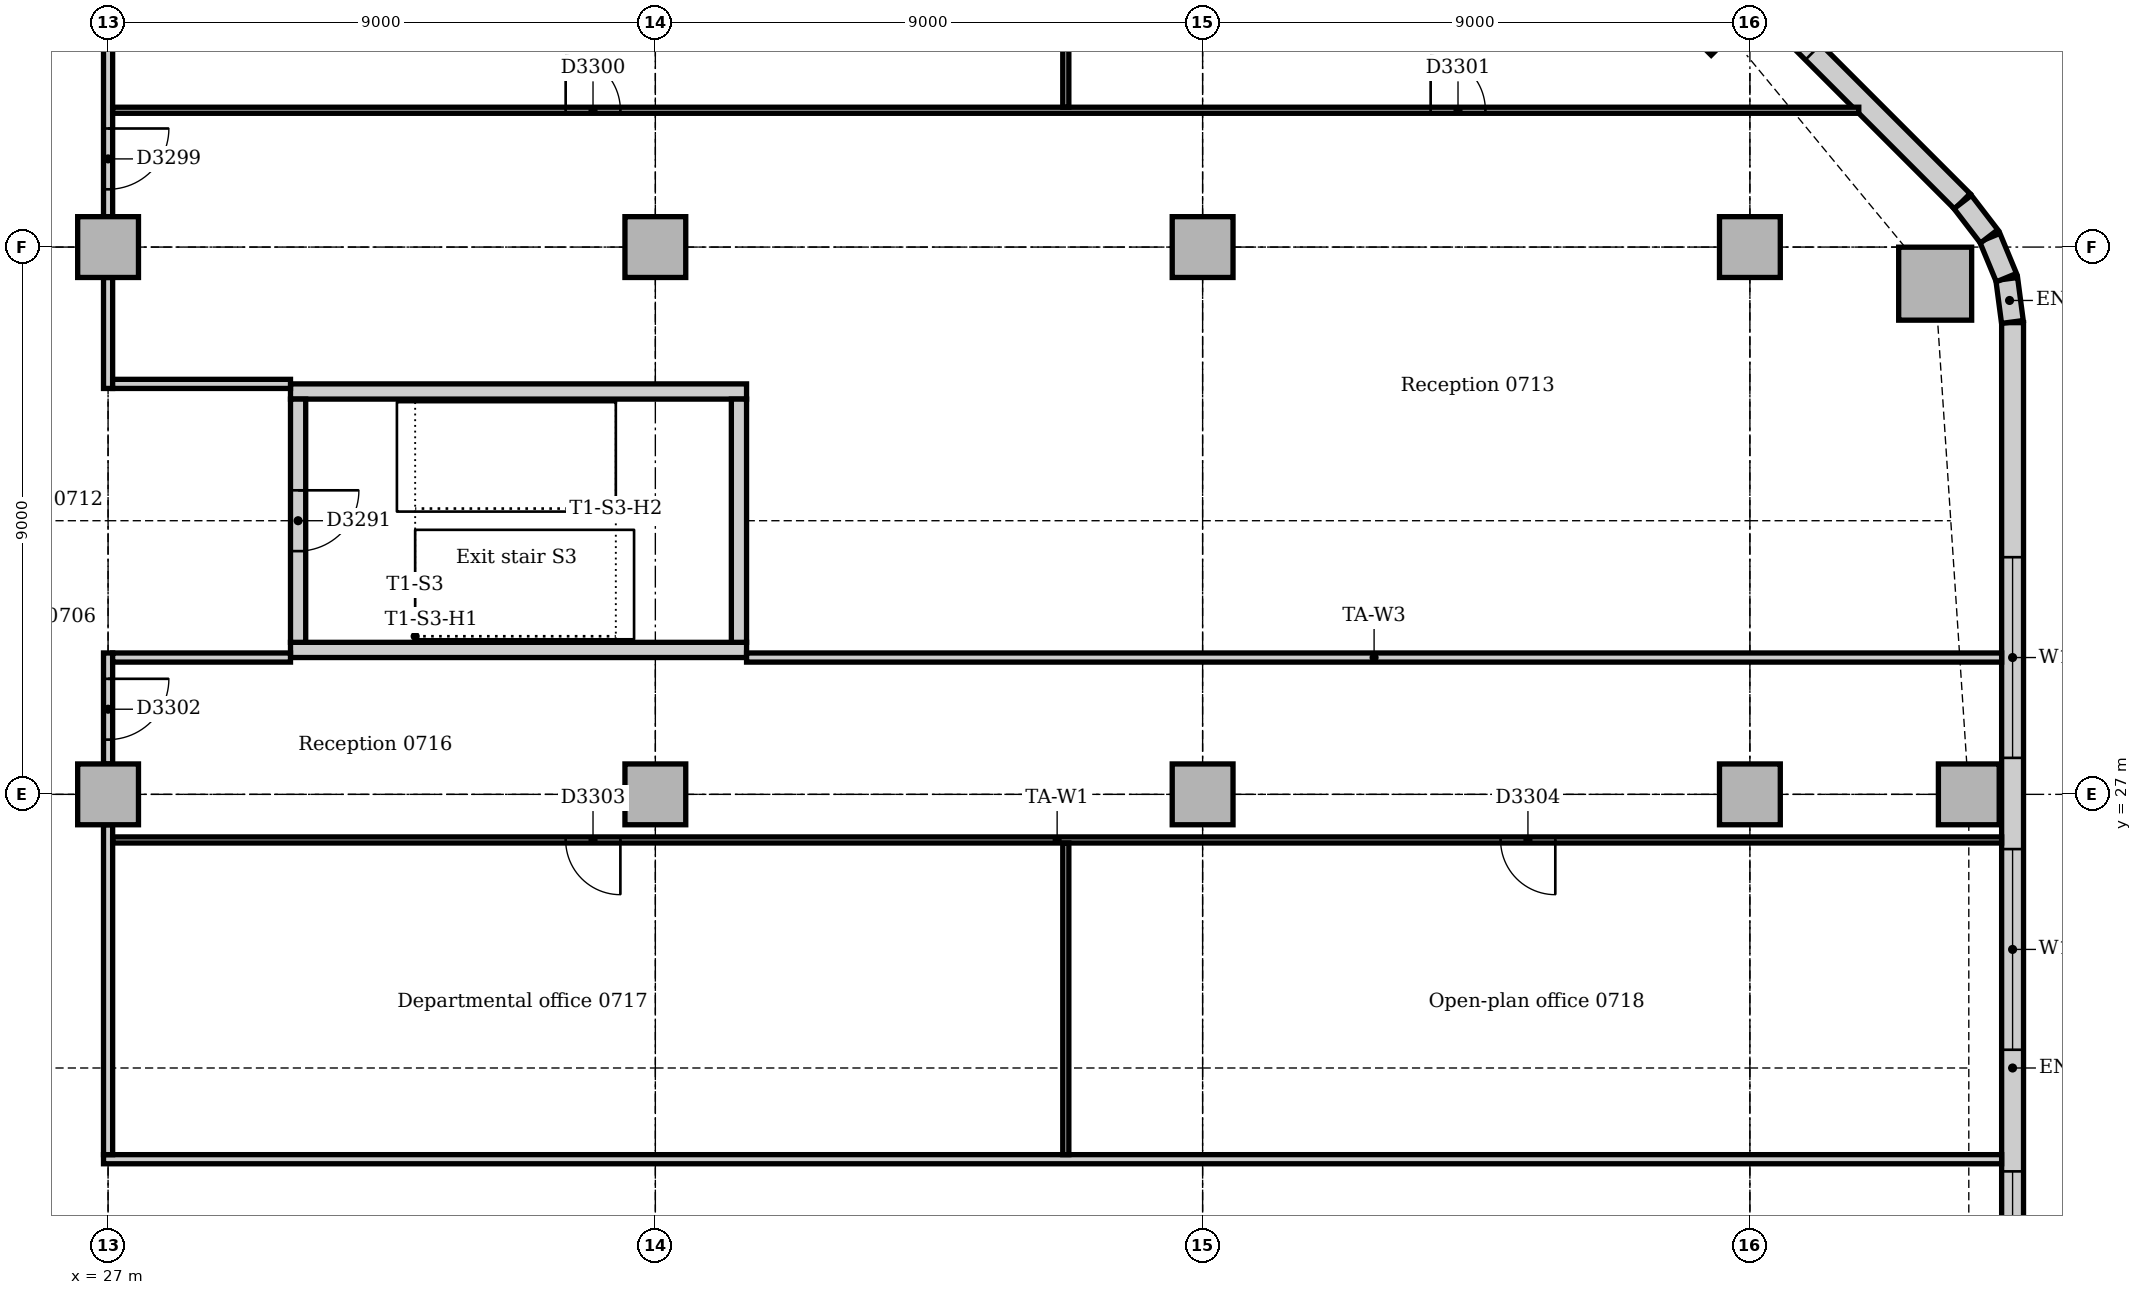
"""IFC4 building model, lengths in metres.
Left out: names, types, materials, properties, quantities, classifications, styles, units other than length and angle.
Written with IfcOpenShell. Run it as: python <this file> out.ifc"""

import sys

from ifc_helpers import new_model, si_unit, direction, frame, frame_2d, origin, origin_2d, place, context, subcontext, project, spatial, rectangle, extrude, element, fill, save


model = new_model("IFC4")
c1 = context("Model", 3, precision=1e-05, world=origin(), true_north=direction((0.0, 1.0)))
c2 = subcontext(c1, "Body", "Model", "MODEL_VIEW")
j1 = project(units=[si_unit("LENGTHUNIT", "METRE"), si_unit("PLANEANGLEUNIT", "RADIAN")], contexts=[c1])
p1 = place(None, origin())
s1 = spatial("IfcSite", under=j1, at=p1, CompositionType="ELEMENT")
p2 = place(p1, origin())
s2 = spatial("IfcBuilding", under=s1, at=p2, CompositionType="ELEMENT")
p3 = place(p2, frame((0.0, 0.0, 34.0)))
s3 = spatial("IfcBuildingStorey", under=s2, at=p3, CompositionType="ELEMENT", Elevation=34.0)
for number, where, z_axis, x_axis in (
    (1, (30.0, 29.375, 0.0), (0.0, 0.0, 1.0), (1.0, 0.0, 0.0)),
    (2, (37.5, 33.625, 0.0), (0.0, 0.0, 1.0), (-1.0, 0.0, 0.0)),
):
    element("IfcWall", number, at=place(p3, frame(where, z_axis=z_axis, x_axis=x_axis)), inside=s3, PredefinedType="SOLIDWALL", context=c2, shape_type="SweptSolid", body=[
        extrude(rectangle(XDim=7.5, YDim=0.25, at=frame_2d((3.75, 0.0))), origin(), (0.0, 0.0, 1.0), 4.0),
    ])
p4 = place(p3, frame((37.375, 29.5, 0.0), z_axis=(0.0, 0.0, 1.0), x_axis=(0.0, 1.0, 0.0)))
e3 = element("IfcWall", 3, at=p4, inside=s3, PredefinedType="SOLIDWALL", context=c2, shape_type="SweptSolid", body=[
    extrude(rectangle(XDim=4.0, YDim=0.25, at=frame_2d((2.0, 0.0))), origin(), (0.0, 0.0, 1.0), 4.0),
])
p5 = place(p3, frame((30.125, 33.5, 0.0), z_axis=(0.0, 0.0, 1.0), x_axis=(0.0, -1.0, 0.0)))
e4 = element("IfcWall", 4, at=p5, inside=s3, PredefinedType="SOLIDWALL", context=c2, shape_type="SweptSolid", body=[
    extrude(rectangle(XDim=4.0, YDim=0.25, at=frame_2d((2.0, 0.0))), origin(), (0.0, 0.0, 1.0), 4.0),
])
p6 = place(p5, frame((1.5, 0.0, 0.0)))
e5 = element("IfcOpeningElement", 5, at=p6, cuts=e4, PredefinedType="OPENING", context=c2, shape_type="SweptSolid", body=[
    extrude(rectangle(XDim=1.0, YDim=2.1, at=frame_2d((0.5, 1.05))), frame((0.0, 0.135, 0.0), z_axis=(0.0, -1.0, 0.0), x_axis=(1.0, 0.0, 0.0)), (0.0, 0.0, 1.0), 0.27),
])
p7 = place(p3, frame((57.047, 35.398, 0.0), z_axis=(0.0, 0.0, 1.0), x_axis=(1.0, 0.0, 0.0)))
e6 = element("IfcColumn", 6, at=p7, inside=s3, PredefinedType="COLUMN", context=c2, shape_type="SweptSolid", body=[
    extrude(rectangle(XDim=1.2, YDim=1.2, at=origin_2d()), origin(), (0.0, 0.0, 1.0), 3.85),
])
for number, where, z_axis, x_axis in (
    (7, (57.6, 27.0, 0.0), (0.0, 0.0, 1.0), (1.0, 0.0, 0.0)),
    (8, (53.364, 39.864, 0.0), (0.0, 0.0, 1.0), (0.707, 0.707, 0.0)),
    (9, (27.0, 27.0, 0.0), (0.0, 0.0, 1.0), (1.0, 0.0, 0.0)),
    (10, (27.0, 36.0, 0.0), (0.0, 0.0, 1.0), (1.0, 0.0, 0.0)),
    (11, (36.0, 27.0, 0.0), (0.0, 0.0, 1.0), (1.0, 0.0, 0.0)),
    (12, (36.0, 36.0, 0.0), (0.0, 0.0, 1.0), (1.0, 0.0, 0.0)),
    (13, (45.0, 27.0, 0.0), (0.0, 0.0, 1.0), (1.0, 0.0, 0.0)),
    (14, (45.0, 36.0, 0.0), (0.0, 0.0, 1.0), (1.0, 0.0, 0.0)),
    (15, (54.0, 27.0, 0.0), (0.0, 0.0, 1.0), (1.0, 0.0, 0.0)),
    (16, (54.0, 36.0, 0.0), (0.0, 0.0, 1.0), (1.0, 0.0, 0.0)),
):
    element("IfcColumn", number, at=place(p3, frame(where, z_axis=z_axis, x_axis=x_axis)), inside=s3, PredefinedType="COLUMN", context=c2, shape_type="SweptSolid", body=[
        extrude(rectangle(XDim=1.0, YDim=1.0, at=origin_2d()), origin(), (0.0, 0.0, 1.0), 3.85),
    ])
p8 = place(p3, frame((58.32, 10.243, 0.0), z_axis=(0.0, 0.0, 1.0), x_axis=(0.0, 1.0, 0.0)))
e17 = element("IfcWall", 17, at=p8, inside=s3, PredefinedType="STANDARD", context=c2, shape_type="SweptSolid", body=[
    extrude(rectangle(XDim=24.515, YDim=0.36, at=frame_2d((12.257, 0.0))), origin(), (0.0, 0.0, 1.0), 3.85),
])
p9 = place(p8, frame((3.857, 0.0, 0.9)))
e18 = element("IfcOpeningElement", 18, at=p9, cuts=e17, PredefinedType="OPENING", context=c2, shape_type="SweptSolid", body=[
    extrude(rectangle(XDim=3.3, YDim=1.6, at=frame_2d((1.65, 0.8))), frame((0.0, 0.19, 0.0), z_axis=(0.0, -1.0, 0.0), x_axis=(1.0, 0.0, 0.0)), (0.0, 0.0, 1.0), 0.38),
])
p10 = place(p8, frame((8.757, 0.0, 0.9)))
e19 = element("IfcOpeningElement", 19, at=p10, cuts=e17, PredefinedType="OPENING", context=c2, shape_type="SweptSolid", body=[
    extrude(rectangle(XDim=1.8, YDim=1.6, at=frame_2d((0.9, 0.8))), frame((0.0, 0.19, 0.0), z_axis=(0.0, -1.0, 0.0), x_axis=(1.0, 0.0, 0.0)), (0.0, 0.0, 1.0), 0.38),
])
p11 = place(p8, frame((12.557, 0.0, 0.9)))
e20 = element("IfcOpeningElement", 20, at=p11, cuts=e17, PredefinedType="OPENING", context=c2, shape_type="SweptSolid", body=[
    extrude(rectangle(XDim=3.3, YDim=1.6, at=frame_2d((1.65, 0.8))), frame((0.0, 0.19, 0.0), z_axis=(0.0, -1.0, 0.0), x_axis=(1.0, 0.0, 0.0)), (0.0, 0.0, 1.0), 0.38),
])
p12 = place(p8, frame((17.357, 0.0, 0.9)))
e21 = element("IfcOpeningElement", 21, at=p12, cuts=e17, PredefinedType="OPENING", context=c2, shape_type="SweptSolid", body=[
    extrude(rectangle(XDim=3.3, YDim=1.6, at=frame_2d((1.65, 0.8))), frame((0.0, 0.19, 0.0), z_axis=(0.0, -1.0, 0.0), x_axis=(1.0, 0.0, 0.0)), (0.0, 0.0, 1.0), 0.38),
])
p13 = place(p3, frame((57.494, 36.751, 0.0), z_axis=(0.0, 0.0, 1.0), x_axis=(-0.707106781187, 0.707106781187, 0.0)))
e22 = element("IfcWall", 22, at=p13, inside=s3, PredefinedType="STANDARD", context=c2, shape_type="SweptSolid", body=[
    extrude(rectangle(XDim=10.243, YDim=0.36, at=frame_2d((5.121, 0.0))), origin(), (0.0, 0.0, 1.0), 3.85),
])
p14 = place(p13, frame((3.471, 0.0, 0.9)))
e23 = element("IfcOpeningElement", 23, at=p14, cuts=e22, PredefinedType="OPENING", context=c2, shape_type="SweptSolid", body=[
    extrude(rectangle(XDim=3.3, YDim=1.6, at=frame_2d((1.65, 0.8))), frame((0.0, 0.19, 0.0), z_axis=(0.0, -1.0, 0.0), x_axis=(1.0, 0.0, 0.0)), (0.0, 0.0, 1.0), 0.38),
])
for number, where, z_axis, x_axis in (
    (24, (58.317, 34.769, 0.0), (0.0, 0.0, 1.0), (-0.131, 0.991, 0.0)),
    (25, (58.218, 35.497, 0.0), (0.0, 0.0, 1.0), (-0.383, 0.924, 0.0)),
):
    element("IfcWall", number, at=place(p3, frame(where, z_axis=z_axis, x_axis=x_axis)), inside=s3, PredefinedType="STANDARD", context=c2, shape_type="SweptSolid", body=[
        extrude(rectangle(XDim=0.713, YDim=0.36, at=frame_2d((0.356, 0.0))), origin(), (0.0, 0.0, 1.0), 3.85),
    ])
p15 = place(p3, frame((57.934, 36.175, 0.0), z_axis=(0.0, 0.0, 1.0), x_axis=(-0.608802368033, 0.793321924995, 0.0)))
e26 = element("IfcWall", 26, at=p15, inside=s3, PredefinedType="STANDARD", context=c2, shape_type="SweptSolid", body=[
    extrude(rectangle(XDim=0.713, YDim=0.36, at=frame_2d((0.357, 0.0))), origin(), (0.0, 0.0, 1.0), 3.85),
])
p16 = place(p3, frame((26.925, 21.0, 0.0), z_axis=(0.0, 0.0, 1.0), x_axis=(1.0, 0.0, 0.0)))
e27 = element("IfcWall", 27, at=p16, inside=s3, PredefinedType="PARTITIONING", context=c2, shape_type="SweptSolid", body=[
    extrude(rectangle(XDim=31.215, YDim=0.15, at=frame_2d((15.607, 0.0))), origin(), (0.0, 0.0, 1.0), 3.85),
])
p17 = place(p3, frame((27.0, 33.675, 0.0), z_axis=(0.0, 0.0, 1.0), x_axis=(0.0, 1.0, 0.0)))
e28 = element("IfcWall", 28, at=p17, inside=s3, PredefinedType="PARTITIONING", context=c2, shape_type="SweptSolid", body=[
    extrude(rectangle(XDim=1.825, YDim=0.15, at=frame_2d((0.912, 0.0))), origin(), (0.0, 0.0, 1.0), 3.158),
])
p18 = place(p3, frame((27.0, 36.5, 0.0), z_axis=(0.0, 0.0, 1.0), x_axis=(0.0, 1.0, 0.0)))
e29 = element("IfcWall", 29, at=p18, inside=s3, PredefinedType="PARTITIONING", context=c2, shape_type="SweptSolid", body=[
    extrude(rectangle(XDim=7.1, YDim=0.15, at=frame_2d((3.55, 0.0))), origin(), (0.0, 0.0, 1.0), 3.158),
])
p19 = place(p18, frame((0.45, 0.0, 0.0)))
e30 = element("IfcOpeningElement", 30, at=p19, cuts=e29, PredefinedType="OPENING", context=c2, shape_type="SweptSolid", body=[
    extrude(rectangle(XDim=1.0, YDim=2.1, at=frame_2d((0.5, 1.05))), frame((0.0, 0.085, 0.0), z_axis=(0.0, -1.0, 0.0), x_axis=(1.0, 0.0, 0.0)), (0.0, 0.0, 1.0), 0.17),
])
p20 = place(p3, frame((27.0, 21.075, 0.0), z_axis=(0.0, 0.0, 1.0), x_axis=(0.0, 1.0, 0.0)))
e31 = element("IfcWall", 31, at=p20, inside=s3, PredefinedType="PARTITIONING", context=c2, shape_type="SweptSolid", body=[
    extrude(rectangle(XDim=5.425, YDim=0.15, at=frame_2d((2.712, 0.0))), origin(), (0.0, 0.0, 1.0), 3.158),
])
p21 = place(p3, frame((27.0, 27.5, 0.0), z_axis=(0.0, 0.0, 1.0), x_axis=(0.0, 1.0, 0.0)))
e32 = element("IfcWall", 32, at=p21, inside=s3, PredefinedType="PARTITIONING", context=c2, shape_type="SweptSolid", body=[
    extrude(rectangle(XDim=1.825, YDim=0.15, at=frame_2d((0.912, 0.0))), origin(), (0.0, 0.0, 1.0), 3.158),
])
p22 = place(p21, frame((0.4, 0.0, 0.0)))
e33 = element("IfcOpeningElement", 33, at=p22, cuts=e32, PredefinedType="OPENING", context=c2, shape_type="SweptSolid", body=[
    extrude(rectangle(XDim=1.0, YDim=2.1, at=frame_2d((0.5, 1.05))), frame((0.0, 0.085, 0.0), z_axis=(0.0, -1.0, 0.0), x_axis=(1.0, 0.0, 0.0)), (0.0, 0.0, 1.0), 0.17),
])
for number, where, z_axis, x_axis in (
    (34, (27.075, 29.25, 0.0), (0.0, 0.0, 1.0), (1.0, 0.0, 0.0)),
    (35, (27.075, 33.75, 0.0), (0.0, 0.0, 1.0), (1.0, 0.0, 0.0)),
):
    element("IfcWall", number, at=place(p3, frame(where, z_axis=z_axis, x_axis=x_axis)), inside=s3, PredefinedType="PARTITIONING", context=c2, shape_type="SweptSolid", body=[
        extrude(rectangle(XDim=2.925, YDim=0.15, at=frame_2d((1.462, 0.0))), origin(), (0.0, 0.0, 1.0), 3.85),
    ])
p23 = place(p3, frame((37.5, 29.25, 0.0), z_axis=(0.0, 0.0, 1.0), x_axis=(1.0, 0.0, 0.0)))
e36 = element("IfcWall", 36, at=p23, inside=s3, PredefinedType="PARTITIONING", context=c2, shape_type="SweptSolid", body=[
    extrude(rectangle(XDim=20.64, YDim=0.15, at=frame_2d((10.32, 0.0))), origin(), (0.0, 0.0, 1.0), 3.85),
])
p24 = place(p3, frame((27.075, 26.25, 0.0), z_axis=(0.0, 0.0, 1.0), x_axis=(1.0, 0.0, 0.0)))
e37 = element("IfcWall", 37, at=p24, inside=s3, PredefinedType="PARTITIONING", context=c2, shape_type="SweptSolid", body=[
    extrude(rectangle(XDim=31.065, YDim=0.1, at=frame_2d((15.533, 0.0))), origin(), (0.0, 0.0, 1.0), 3.85),
])
p25 = place(p24, frame((7.45, 0.0, 0.0)))
e38 = element("IfcOpeningElement", 38, at=p25, cuts=e37, PredefinedType="OPENING", context=c2, shape_type="SweptSolid", body=[
    extrude(rectangle(XDim=0.9, YDim=2.1, at=frame_2d((0.45, 1.05))), frame((0.0, 0.06, 0.0), z_axis=(0.0, -1.0, 0.0), x_axis=(1.0, 0.0, 0.0)), (0.0, 0.0, 1.0), 0.12),
])
p26 = place(p24, frame((22.825, 0.0, 0.0)))
e39 = element("IfcOpeningElement", 39, at=p26, cuts=e37, PredefinedType="OPENING", context=c2, shape_type="SweptSolid", body=[
    extrude(rectangle(XDim=0.9, YDim=2.1, at=frame_2d((0.45, 1.05))), frame((0.0, 0.06, 0.0), z_axis=(0.0, -1.0, 0.0), x_axis=(1.0, 0.0, 0.0)), (0.0, 0.0, 1.0), 0.12),
])
p27 = place(p3, frame((27.075, 38.25, 0.0), z_axis=(0.0, 0.0, 1.0), x_axis=(1.0, 0.0, 0.0)))
e40 = element("IfcWall", 40, at=p27, inside=s3, PredefinedType="PARTITIONING", context=c2, shape_type="SweptSolid", body=[
    extrude(rectangle(XDim=28.716, YDim=0.1, at=frame_2d((14.358, 0.0))), origin(), (0.0, 0.0, 1.0), 3.85),
])
p28 = place(p27, frame((7.45, 0.0, 0.0)))
e41 = element("IfcOpeningElement", 41, at=p28, cuts=e40, PredefinedType="OPENING", context=c2, shape_type="SweptSolid", body=[
    extrude(rectangle(XDim=0.9, YDim=2.1, at=frame_2d((0.45, 1.05))), frame((0.0, 0.06, 0.0), z_axis=(0.0, -1.0, 0.0), x_axis=(1.0, 0.0, 0.0)), (0.0, 0.0, 1.0), 0.12),
])
p29 = place(p27, frame((21.675, 0.0, 0.0)))
e42 = element("IfcOpeningElement", 42, at=p29, cuts=e40, PredefinedType="OPENING", context=c2, shape_type="SweptSolid", body=[
    extrude(rectangle(XDim=0.9, YDim=2.1, at=frame_2d((0.45, 1.05))), frame((0.0, 0.06, 0.0), z_axis=(0.0, -1.0, 0.0), x_axis=(1.0, 0.0, 0.0)), (0.0, 0.0, 1.0), 0.12),
])
p30 = place(p3, frame((42.75, 38.3, 0.0), z_axis=(0.0, 0.0, 1.0), x_axis=(0.0, 1.0, 0.0)))
e43 = element("IfcWall", 43, at=p30, inside=s3, PredefinedType="PARTITIONING", context=c2, shape_type="SweptSolid", body=[
    extrude(rectangle(XDim=6.34, YDim=0.1, at=frame_2d((3.17, 0.0))), origin(), (0.0, 0.0, 1.0), 3.85),
])
p31 = place(p3, frame((42.75, 21.075, 0.0), z_axis=(0.0, 0.0, 1.0), x_axis=(0.0, 1.0, 0.0)))
e44 = element("IfcWall", 44, at=p31, inside=s3, PredefinedType="PARTITIONING", context=c2, shape_type="SweptSolid", body=[
    extrude(rectangle(XDim=5.125, YDim=0.1, at=frame_2d((2.562, 0.0))), origin(), (0.0, 0.0, 1.0), 3.85),
])
p32 = place(p10, origin())
e45 = element("IfcWindow", 45, at=p32, inside=s3, PartitioningType="SINGLE_PANEL", PredefinedType="WINDOW", context=c2, shape_type="SweptSolid", body=[
    extrude(rectangle(XDim=1.8, YDim=1.6, at=frame_2d((0.9, 0.8))), frame((0.0, 0.13, 0.0), z_axis=(0.0, -1.0, 0.0), x_axis=(1.0, 0.0, 0.0)), (0.0, 0.0, 1.0), 0.06),
])
fill(e19, e45)
p33 = place(p11, origin())
e46 = element("IfcWindow", 46, at=p33, inside=s3, PartitioningType="SINGLE_PANEL", PredefinedType="WINDOW", context=c2, shape_type="SweptSolid", body=[
    extrude(rectangle(XDim=3.3, YDim=1.6, at=frame_2d((1.65, 0.8))), frame((0.0, 0.13, 0.0), z_axis=(0.0, -1.0, 0.0), x_axis=(1.0, 0.0, 0.0)), (0.0, 0.0, 1.0), 0.06),
])
fill(e20, e46)
p34 = place(p12, origin())
e47 = element("IfcWindow", 47, at=p34, inside=s3, PartitioningType="SINGLE_PANEL", PredefinedType="WINDOW", context=c2, shape_type="SweptSolid", body=[
    extrude(rectangle(XDim=3.3, YDim=1.6, at=frame_2d((1.65, 0.8))), frame((0.0, 0.13, 0.0), z_axis=(0.0, -1.0, 0.0), x_axis=(1.0, 0.0, 0.0)), (0.0, 0.0, 1.0), 0.06),
])
fill(e21, e47)
p35 = place(p14, origin())
e48 = element("IfcWindow", 48, at=p35, inside=s3, PartitioningType="SINGLE_PANEL", PredefinedType="WINDOW", context=c2, shape_type="SweptSolid", body=[
    extrude(rectangle(XDim=3.3, YDim=1.6, at=frame_2d((1.65, 0.8))), frame((0.0, 0.13, 0.0), z_axis=(0.0, -1.0, 0.0), x_axis=(1.0, 0.0, 0.0)), (0.0, 0.0, 1.0), 0.06),
])
fill(e23, e48)
p36 = place(p6, origin())
e49 = element("IfcDoor", 49, at=p36, inside=s3, OperationType="SINGLE_SWING_LEFT", PredefinedType="DOOR", context=c2, shape_type="SweptSolid", body=[
    extrude(rectangle(XDim=1.0, YDim=2.1, at=frame_2d((0.5, 1.05))), frame((0.0, 0.025, 0.0), z_axis=(0.0, -1.0, 0.0), x_axis=(1.0, 0.0, 0.0)), (0.0, 0.0, 1.0), 0.05),
])
fill(e5, e49)
p37 = place(p19, frame((1.0, 0.0, 0.0), z_axis=(0.0, 0.0, 1.0), x_axis=(-1.0, 0.0, 0.0)))
e50 = element("IfcDoor", 50, at=p37, inside=s3, OperationType="SINGLE_SWING_LEFT", PredefinedType="DOOR", context=c2, shape_type="SweptSolid", body=[
    extrude(rectangle(XDim=1.0, YDim=2.1, at=frame_2d((0.5, 1.05))), frame((0.0, 0.025, 0.0), z_axis=(0.0, -1.0, 0.0), x_axis=(1.0, 0.0, 0.0)), (0.0, 0.0, 1.0), 0.05),
])
fill(e30, e50)
p38 = place(p28, origin())
e51 = element("IfcDoor", 51, at=p38, inside=s3, OperationType="SINGLE_SWING_LEFT", PredefinedType="DOOR", context=c2, shape_type="SweptSolid", body=[
    extrude(rectangle(XDim=0.9, YDim=2.1, at=frame_2d((0.45, 1.05))), frame((0.0, 0.025, 0.0), z_axis=(0.0, -1.0, 0.0), x_axis=(1.0, 0.0, 0.0)), (0.0, 0.0, 1.0), 0.05),
])
fill(e41, e51)
p39 = place(p29, origin())
e52 = element("IfcDoor", 52, at=p39, inside=s3, OperationType="SINGLE_SWING_LEFT", PredefinedType="DOOR", context=c2, shape_type="SweptSolid", body=[
    extrude(rectangle(XDim=0.9, YDim=2.1, at=frame_2d((0.45, 1.05))), frame((0.0, 0.025, 0.0), z_axis=(0.0, -1.0, 0.0), x_axis=(1.0, 0.0, 0.0)), (0.0, 0.0, 1.0), 0.05),
])
fill(e42, e52)
p40 = place(p22, frame((1.0, 0.0, 0.0), z_axis=(0.0, 0.0, 1.0), x_axis=(-1.0, 0.0, 0.0)))
e53 = element("IfcDoor", 53, at=p40, inside=s3, OperationType="SINGLE_SWING_LEFT", PredefinedType="DOOR", context=c2, shape_type="SweptSolid", body=[
    extrude(rectangle(XDim=1.0, YDim=2.1, at=frame_2d((0.5, 1.05))), frame((0.0, 0.025, 0.0), z_axis=(0.0, -1.0, 0.0), x_axis=(1.0, 0.0, 0.0)), (0.0, 0.0, 1.0), 0.05),
])
fill(e33, e53)
p41 = place(p25, frame((0.9, 0.0, 0.0), z_axis=(0.0, 0.0, 1.0), x_axis=(-1.0, 0.0, 0.0)))
e54 = element("IfcDoor", 54, at=p41, inside=s3, OperationType="SINGLE_SWING_LEFT", PredefinedType="DOOR", context=c2, shape_type="SweptSolid", body=[
    extrude(rectangle(XDim=0.9, YDim=2.1, at=frame_2d((0.45, 1.05))), frame((0.0, 0.025, 0.0), z_axis=(0.0, -1.0, 0.0), x_axis=(1.0, 0.0, 0.0)), (0.0, 0.0, 1.0), 0.05),
])
fill(e38, e54)
p42 = place(p26, frame((0.9, 0.0, 0.0), z_axis=(0.0, 0.0, 1.0), x_axis=(-1.0, 0.0, 0.0)))
e55 = element("IfcDoor", 55, at=p42, inside=s3, OperationType="SINGLE_SWING_LEFT", PredefinedType="DOOR", context=c2, shape_type="SweptSolid", body=[
    extrude(rectangle(XDim=0.9, YDim=2.1, at=frame_2d((0.45, 1.05))), frame((0.0, 0.025, 0.0), z_axis=(0.0, -1.0, 0.0), x_axis=(1.0, 0.0, 0.0)), (0.0, 0.0, 1.0), 0.05),
])
fill(e39, e55)
save(model, sys.argv[1])
